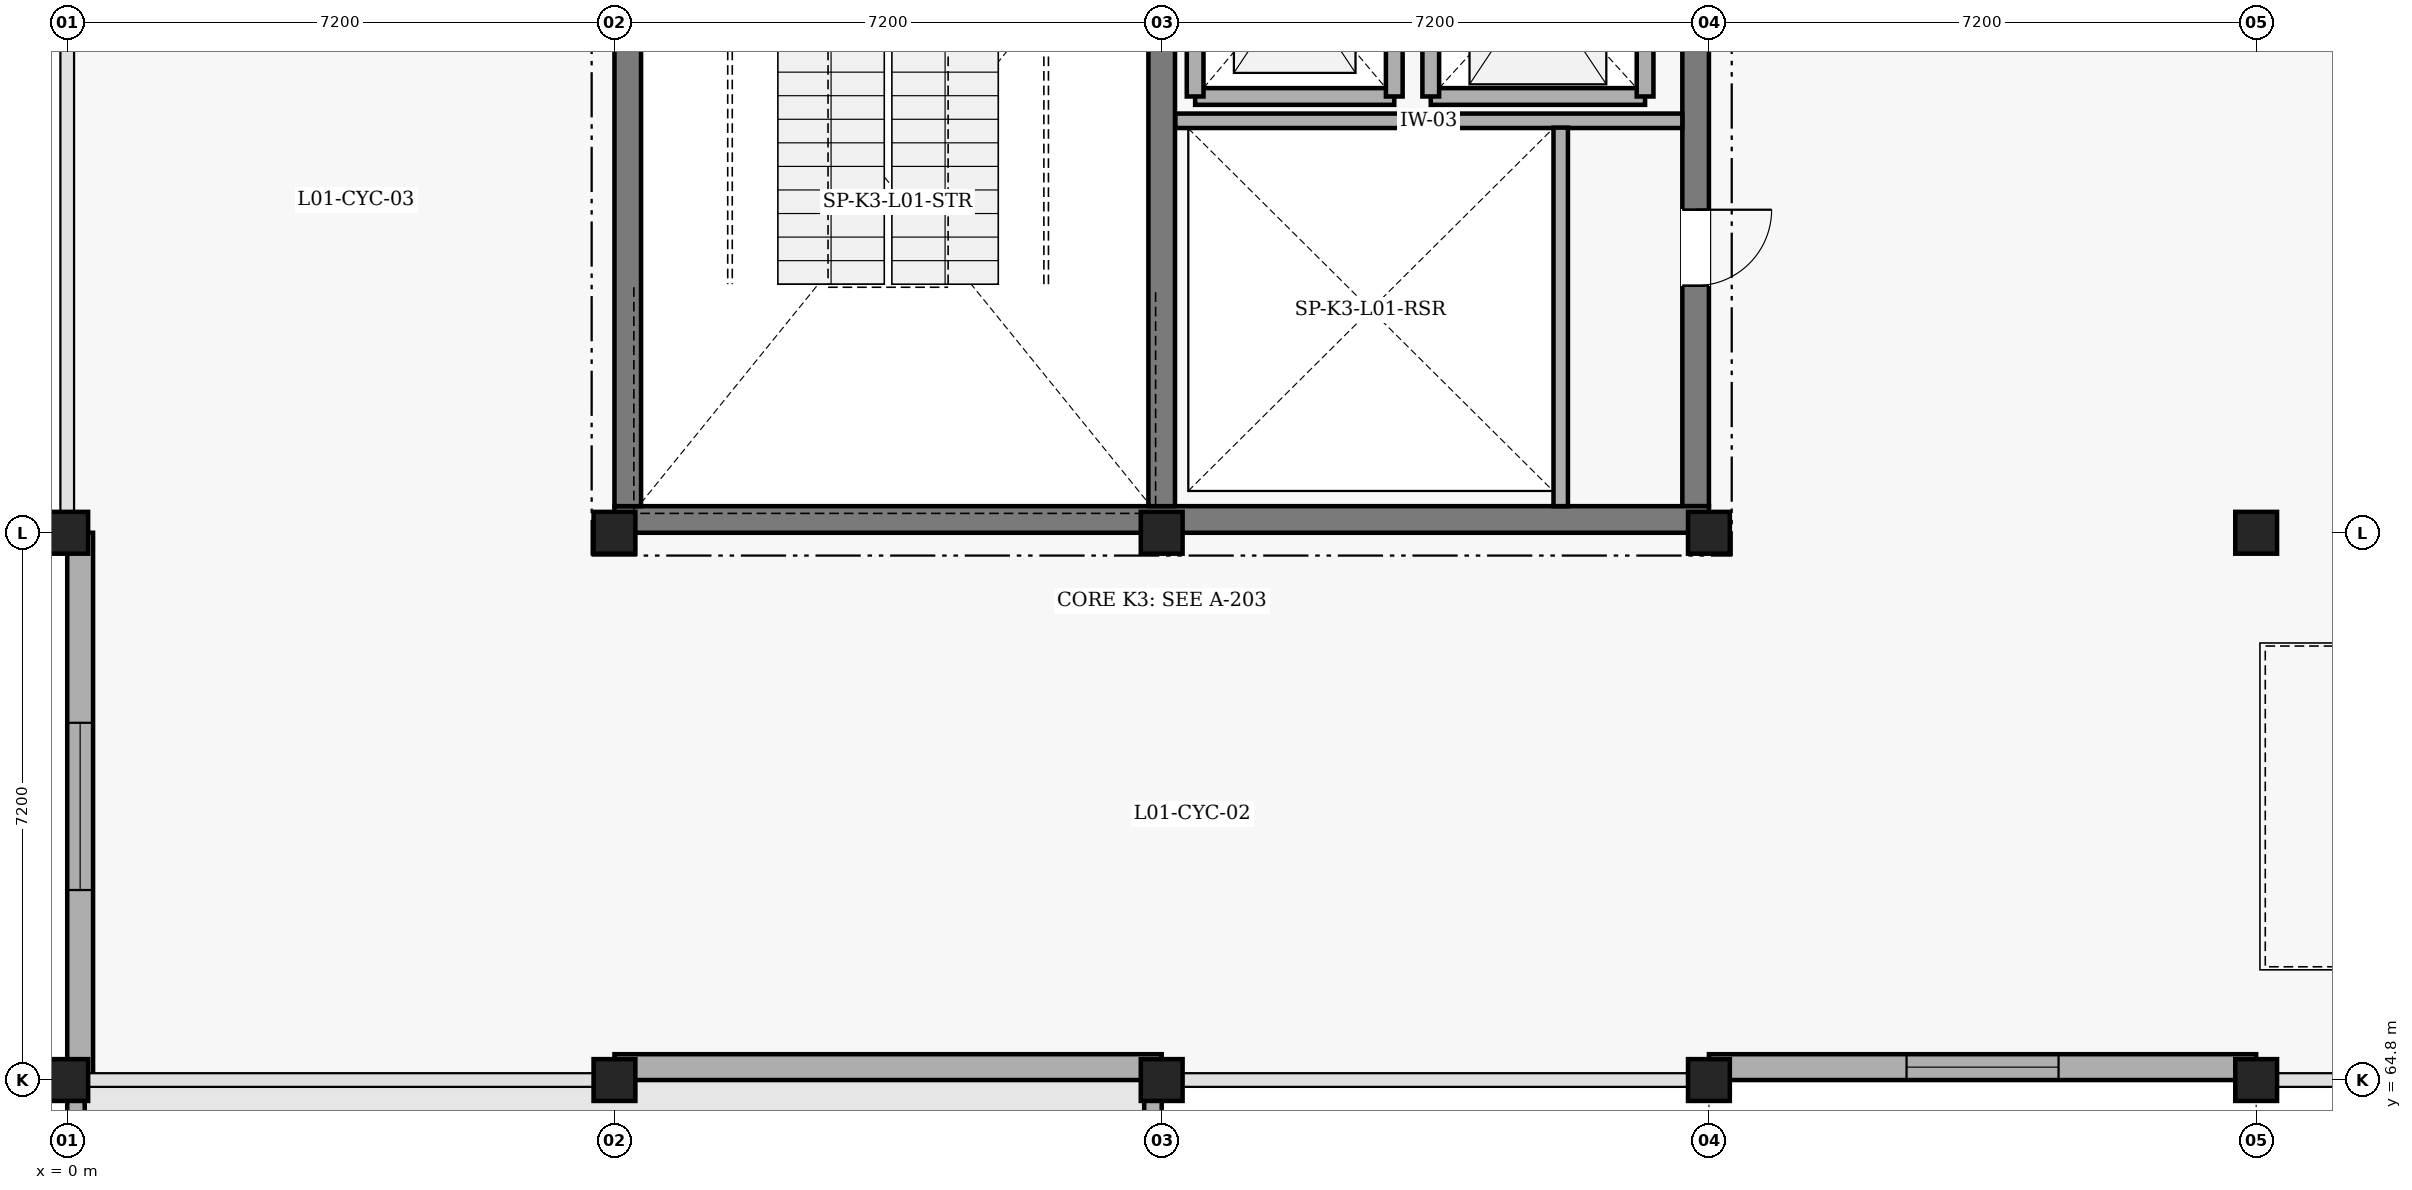
"""IFC4 building model, lengths in metres.
Left out: names, types, materials, properties, quantities, classifications, styles, units other than length and angle.
Written with IfcOpenShell. Run it as: python <this file> out.ifc"""

import sys

from ifc_helpers import new_model, si_unit, direction, frame, frame_2d, origin, origin_2d, place, context, subcontext, project, spatial, rectangle, extrude, element, fill, save


model = new_model("IFC4")
c1 = context("Model", 3, precision=1e-05, world=origin(), true_north=direction((0.0, 1.0)))
c2 = subcontext(c1, "Body", "Model", "MODEL_VIEW")
j1 = project(units=[si_unit("LENGTHUNIT", "METRE"), si_unit("PLANEANGLEUNIT", "RADIAN")], contexts=[c1])
p1 = place(None, origin())
s1 = spatial("IfcSite", under=j1, at=p1, CompositionType="ELEMENT")
p2 = place(p1, origin())
s2 = spatial("IfcBuilding", under=s1, at=p2, CompositionType="ELEMENT")
p3 = place(p2, frame((0.0, 0.0, 5.4)))
s3 = spatial("IfcBuildingStorey", under=s2, at=p3, CompositionType="ELEMENT", Elevation=5.4)
p4 = place(p3, frame((21.425, 86.05, 0.0), z_axis=(0.0, 0.0, 1.0), x_axis=(0.0, -1.0, 0.0)))
e1 = element("IfcWall", 1, at=p4, inside=s3, PredefinedType="SHEAR", context=c2, shape_type="SweptSolid", body=[
    extrude(rectangle(XDim=13.7, YDim=0.35, at=frame_2d((6.85, 0.0))), origin(), (0.0, 0.0, 1.0), 4.2),
])
p5 = place(p4, frame((9.8, 0.0, 0.0)))
e2 = element("IfcOpeningElement", 2, at=p5, cuts=e1, PredefinedType="OPENING", context=c2, shape_type="SweptSolid", body=[
    extrude(rectangle(XDim=1.0, YDim=2.15, at=frame_2d((0.5, 1.075))), frame((0.0, 0.185, 0.0), z_axis=(0.0, -1.0, 0.0), x_axis=(1.0, 0.0, 0.0)), (0.0, 0.0, 1.0), 0.37),
])
p6 = place(p4, frame((2.3, 0.0, 0.0)))
e3 = element("IfcOpeningElement", 3, at=p6, cuts=e1, PredefinedType="OPENING", context=c2, shape_type="SweptSolid", body=[
    extrude(rectangle(XDim=1.25, YDim=2.2, at=frame_2d((0.625, 1.1))), frame((0.0, 0.185, 0.0), z_axis=(0.0, -1.0, 0.0), x_axis=(1.0, 0.0, 0.0)), (0.0, 0.0, 1.0), 0.37),
])
p7 = place(p3, frame((21.6, 72.175, 0.0), z_axis=(0.0, 0.0, 1.0), x_axis=(-1.0, 0.0, 0.0)))
e4 = element("IfcWall", 4, at=p7, inside=s3, PredefinedType="SHEAR", context=c2, shape_type="SweptSolid", body=[
    extrude(rectangle(XDim=14.4, YDim=0.35, at=frame_2d((7.2, 0.0))), origin(), (0.0, 0.0, 1.0), 4.2),
])
p8 = place(p3, frame((7.375, 72.35, 0.0), z_axis=(0.0, 0.0, 1.0), x_axis=(0.0, 1.0, 0.0)))
e5 = element("IfcWall", 5, at=p8, inside=s3, PredefinedType="SHEAR", context=c2, shape_type="SweptSolid", body=[
    extrude(rectangle(XDim=13.7, YDim=0.35, at=frame_2d((6.85, 0.0))), origin(), (0.0, 0.0, 1.0), 4.2),
])
p9 = place(p8, frame((9.8, 0.0, 0.0)))
e6 = element("IfcOpeningElement", 6, at=p9, cuts=e5, PredefinedType="OPENING", context=c2, shape_type="SweptSolid", body=[
    extrude(rectangle(XDim=1.25, YDim=2.2, at=frame_2d((0.625, 1.1))), frame((0.0, 0.185, 0.0), z_axis=(0.0, -1.0, 0.0), x_axis=(1.0, 0.0, 0.0)), (0.0, 0.0, 1.0), 0.37),
])
p10 = place(p3, frame((14.4, 86.05, 0.0), z_axis=(0.0, 0.0, 1.0), x_axis=(0.0, -1.0, 0.0)))
e7 = element("IfcWall", 7, at=p10, inside=s3, PredefinedType="SHEAR", context=c2, shape_type="SweptSolid", body=[
    extrude(rectangle(XDim=13.7, YDim=0.35, at=frame_2d((6.85, 0.0))), origin(), (0.0, 0.0, 1.0), 4.2),
])
p11 = place(p10, frame((1.5, 0.0, 0.0)))
e8 = element("IfcOpeningElement", 8, at=p11, cuts=e7, PredefinedType="OPENING", context=c2, shape_type="SweptSolid", body=[
    extrude(rectangle(XDim=1.25, YDim=2.2, at=frame_2d((0.625, 1.1))), frame((0.0, 0.185, 0.0), z_axis=(0.0, -1.0, 0.0), x_axis=(1.0, 0.0, 0.0)), (0.0, 0.0, 1.0), 0.37),
])
for number, where, z_axis, x_axis in (
    (9, (0.0, 64.8, 0.0), (0.0, 0.0, 1.0), (1.0, 0.0, 0.0)),
    (10, (0.0, 72.0, 0.0), (0.0, 0.0, 1.0), (0.0, 1.0, 0.0)),
    (11, (7.2, 64.8, 0.0), (0.0, 0.0, 1.0), (1.0, 0.0, 0.0)),
    (12, (7.2, 72.0, 0.0), (0.0, 0.0, 1.0), (1.0, 0.0, 0.0)),
    (13, (14.4, 64.8, 0.0), (0.0, 0.0, 1.0), (1.0, 0.0, 0.0)),
    (14, (14.4, 72.0, 0.0), (0.0, 0.0, 1.0), (1.0, 0.0, 0.0)),
    (15, (21.6, 64.8, 0.0), (0.0, 0.0, 1.0), (1.0, 0.0, 0.0)),
    (16, (21.6, 72.0, 0.0), (0.0, 0.0, 1.0), (1.0, 0.0, 0.0)),
    (17, (28.8, 64.8, 0.0), (0.0, 0.0, 1.0), (1.0, 0.0, 0.0)),
    (18, (28.8, 72.0, 0.0), (0.0, 0.0, 1.0), (1.0, 0.0, 0.0)),
):
    element("IfcColumn", number, at=place(p3, frame(where, z_axis=z_axis, x_axis=x_axis)), inside=s3, PredefinedType="COLUMN", context=c2, shape_type="SweptSolid", body=[
        extrude(rectangle(XDim=0.55, YDim=0.55, at=origin_2d()), origin(), (0.0, 0.0, 1.0), 3.92),
    ])
p12 = place(p3, frame((28.8, 64.97, 0.0), z_axis=(0.0, 0.0, 1.0), x_axis=(-1.0, 0.0, 0.0)))
e19 = element("IfcWall", 19, at=p12, inside=s3, PredefinedType="SOLIDWALL", context=c2, shape_type="SweptSolid", body=[
    extrude(rectangle(XDim=7.2, YDim=0.34, at=frame_2d((3.6, 0.0))), origin(), (0.0, 0.0, 1.0), 3.62),
])
p13 = place(p12, frame((2.6, 0.0, 0.9)))
e20 = element("IfcOpeningElement", 20, at=p13, cuts=e19, PredefinedType="OPENING", context=c2, shape_type="SweptSolid", body=[
    extrude(rectangle(XDim=2.0, YDim=1.65, at=frame_2d((1.0, 0.825))), frame((0.0, 0.18, 0.0), z_axis=(0.0, -1.0, 0.0), x_axis=(1.0, 0.0, 0.0)), (0.0, 0.0, 1.0), 0.36),
])
p14 = place(p3, frame((14.4, 64.97, 0.0), z_axis=(0.0, 0.0, 1.0), x_axis=(-1.0, 0.0, 0.0)))
e21 = element("IfcWall", 21, at=p14, inside=s3, PredefinedType="SOLIDWALL", context=c2, shape_type="SweptSolid", body=[
    extrude(rectangle(XDim=7.2, YDim=0.34, at=frame_2d((3.6, 0.0))), origin(), (0.0, 0.0, 1.0), 3.62),
])
p15 = place(p3, frame((0.17, 64.8, 0.0), z_axis=(0.0, 0.0, 1.0), x_axis=(0.0, 1.0, 0.0)))
e22 = element("IfcWall", 22, at=p15, inside=s3, PredefinedType="SOLIDWALL", context=c2, shape_type="SweptSolid", body=[
    extrude(rectangle(XDim=7.2, YDim=0.34, at=frame_2d((3.6, 0.0))), origin(), (0.0, 0.0, 1.0), 3.59),
])
p16 = place(p15, frame((2.5, 0.0, 0.9)))
e23 = element("IfcOpeningElement", 23, at=p16, cuts=e22, PredefinedType="OPENING", context=c2, shape_type="SweptSolid", body=[
    extrude(rectangle(XDim=2.2, YDim=1.7, at=frame_2d((1.1, 0.85))), frame((0.0, 0.18, 0.0), z_axis=(0.0, -1.0, 0.0), x_axis=(1.0, 0.0, 0.0)), (0.0, 0.0, 1.0), 0.36),
])
for number, where, z_axis, x_axis in (
    (24, (14.285, 50.4, 0.0), (0.0, 0.0, 1.0), (0.0, 1.0, 0.0)),
    (25, (0.115, 64.8, 0.0), (0.0, 0.0, 1.0), (0.0, -1.0, 0.0)),
):
    element("IfcWall", number, at=place(p3, frame(where, z_axis=z_axis, x_axis=x_axis)), inside=s3, PredefinedType="PARAPET", context=c2, shape_type="SweptSolid", body=[
        extrude(rectangle(XDim=14.4, YDim=0.23, at=frame_2d((7.2, 0.0))), origin(), (0.0, 0.0, 1.0), 0.55),
    ])
p17 = place(p3, frame((14.58, 77.42, 0.0), z_axis=(0.0, 0.0, 1.0), x_axis=(1.0, 0.0, 0.0)))
e26 = element("IfcWall", 26, at=p17, inside=s3, PredefinedType="PARTITIONING", context=c2, shape_type="SweptSolid", body=[
    extrude(rectangle(XDim=6.67, YDim=0.19, at=frame_2d((3.335, 0.0))), origin(), (0.0, 0.0, 1.0), 3.85),
])
p18 = place(p3, frame((19.65, 72.35, 0.0), z_axis=(0.0, 0.0, 1.0), x_axis=(0.0, 1.0, 0.0)))
e27 = element("IfcWall", 27, at=p18, inside=s3, PredefinedType="PARTITIONING", context=c2, shape_type="SweptSolid", body=[
    extrude(rectangle(XDim=4.98, YDim=0.19, at=frame_2d((2.49, 0.0))), origin(), (0.0, 0.0, 1.0), 3.85),
])
p19 = place(p3, frame((14.84, 77.74, 0.0), z_axis=(0.0, 0.0, 1.0), x_axis=(1.0, 0.0, 0.0)))
e28 = element("IfcWall", 28, at=p19, inside=s3, PredefinedType="PARTITIONING", context=c2, shape_type="SweptSolid", body=[
    extrude(rectangle(XDim=2.62, YDim=0.22, at=frame_2d((1.31, 0.0))), origin(), (0.0, 0.0, 1.0), 3.85),
])
for number, where, z_axis, x_axis in (
    (29, (14.84, 77.74, 0.0), (0.0, 0.0, 1.0), (0.0, 1.0, 0.0)),
    (30, (17.46, 77.74, 0.0), (0.0, 0.0, 1.0), (0.0, 1.0, 0.0)),
):
    element("IfcWall", number, at=place(p3, frame(where, z_axis=z_axis, x_axis=x_axis)), inside=s3, PredefinedType="PARTITIONING", context=c2, shape_type="SweptSolid", body=[
        extrude(rectangle(XDim=3.0, YDim=0.22, at=frame_2d((1.5, 0.0))), origin(), (0.0, 0.0, 1.0), 3.85),
    ])
p20 = place(p3, frame((17.94, 77.74, 0.0), z_axis=(0.0, 0.0, 1.0), x_axis=(1.0, 0.0, 0.0)))
e31 = element("IfcWall", 31, at=p20, inside=s3, PredefinedType="PARTITIONING", context=c2, shape_type="SweptSolid", body=[
    extrude(rectangle(XDim=2.82, YDim=0.22, at=frame_2d((1.41, 0.0))), origin(), (0.0, 0.0, 1.0), 3.85),
])
for number, where, z_axis, x_axis in (
    (32, (17.94, 77.74, 0.0), (0.0, 0.0, 1.0), (0.0, 1.0, 0.0)),
    (33, (20.76, 77.74, 0.0), (0.0, 0.0, 1.0), (0.0, 1.0, 0.0)),
):
    element("IfcWall", number, at=place(p3, frame(where, z_axis=z_axis, x_axis=x_axis)), inside=s3, PredefinedType="PARTITIONING", context=c2, shape_type="SweptSolid", body=[
        extrude(rectangle(XDim=3.0, YDim=0.22, at=frame_2d((1.5, 0.0))), origin(), (0.0, 0.0, 1.0), 3.85),
    ])
p21 = place(p13, origin())
e34 = element("IfcWindow", 34, at=p21, inside=s3, PartitioningType="SINGLE_PANEL", PredefinedType="WINDOW", context=c2, shape_type="SweptSolid", body=[
    extrude(rectangle(XDim=2.0, YDim=1.65, at=frame_2d((1.0, 0.825))), frame((0.0, 0.03, 0.0), z_axis=(0.0, -1.0, 0.0), x_axis=(1.0, 0.0, 0.0)), (0.0, 0.0, 1.0), 0.06),
])
fill(e20, e34)
p22 = place(p16, origin())
e35 = element("IfcWindow", 35, at=p22, inside=s3, PartitioningType="SINGLE_PANEL", PredefinedType="WINDOW", context=c2, shape_type="SweptSolid", body=[
    extrude(rectangle(XDim=2.2, YDim=1.7, at=frame_2d((1.1, 0.85))), frame((0.0, 0.03, 0.0), z_axis=(0.0, -1.0, 0.0), x_axis=(1.0, 0.0, 0.0)), (0.0, 0.0, 1.0), 0.06),
])
fill(e23, e35)
p23 = place(p5, origin())
e36 = element("IfcDoor", 36, at=p23, inside=s3, OperationType="SINGLE_SWING_LEFT", PredefinedType="DOOR", context=c2, shape_type="SweptSolid", body=[
    extrude(rectangle(XDim=1.0, YDim=2.15, at=frame_2d((0.5, 1.075))), frame((0.0, 0.025, 0.0), z_axis=(0.0, -1.0, 0.0), x_axis=(1.0, 0.0, 0.0)), (0.0, 0.0, 1.0), 0.05),
])
fill(e2, e36)
save(model, sys.argv[1])
